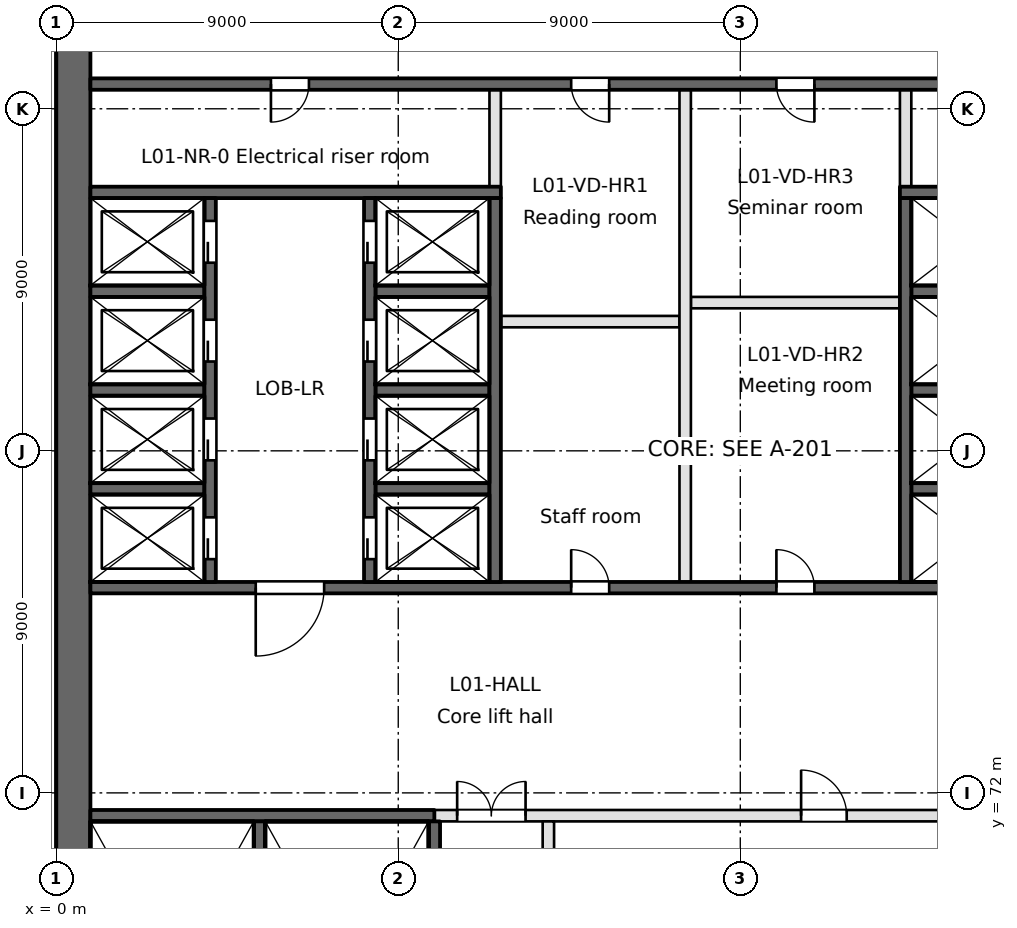
"""IFC4 building model, lengths in metres.
Left out: names, types, materials, properties, quantities, classifications, styles, units other than length and angle.
Written with IfcOpenShell. Run it as: python <this file> out.ifc"""

import sys

from ifc_helpers import new_model, si_unit, direction, frame, frame_2d, origin, place, context, subcontext, project, spatial, rectangle, extrude, element, fill, save


model = new_model("IFC4")
c1 = context("Model", 3, precision=1e-05, world=origin(), true_north=direction((0.0, 1.0)))
c2 = subcontext(c1, "Body", "Model", "MODEL_VIEW")
j1 = project(units=[si_unit("LENGTHUNIT", "METRE"), si_unit("PLANEANGLEUNIT", "RADIAN")], contexts=[c1])
p1 = place(None, origin())
s1 = spatial("IfcSite", under=j1, at=p1, CompositionType="ELEMENT")
p2 = place(p1, origin())
s2 = spatial("IfcBuilding", under=s1, at=p2, CompositionType="ELEMENT")
p3 = place(p2, frame((0.0, 0.0, 6.0)))
s3 = spatial("IfcBuildingStorey", under=s2, at=p3, CompositionType="ELEMENT", Elevation=6.0)
p4 = place(p3, frame((0.45, 94.5, 0.0), z_axis=(0.0, 0.0, 1.0), x_axis=(0.0, -1.0, 0.0)))
e1 = element("IfcWall", 1, at=p4, inside=s3, PredefinedType="SHEAR", context=c2, shape_type="SweptSolid", body=[
    extrude(rectangle(XDim=66.085, YDim=0.9, at=frame_2d((33.042, 0.0))), origin(), (0.0, 0.0, 1.0), 5.4),
])
p5 = place(p3, frame((0.9, 71.4, -0.35), z_axis=(0.0, 0.0, 1.0), x_axis=(1.0, 0.0, 0.0)))
e2 = element("IfcWall", 2, at=p5, inside=s3, PredefinedType="SOLIDWALL", context=c2, shape_type="SweptSolid", body=[
    extrude(rectangle(XDim=9.05, YDim=0.3, at=frame_2d((4.525, 0.0))), origin(), (0.0, 0.0, 1.0), 5.4),
])
p6 = place(p3, frame((9.95, 71.4, 0.0), z_axis=(0.0, 0.0, 1.0), x_axis=(1.0, 0.0, 0.0)))
e3 = element("IfcWall", 3, at=p6, inside=s3, PredefinedType="PARTITIONING", context=c2, shape_type="SweptSolid", body=[
    extrude(rectangle(XDim=17.65, YDim=0.3, at=frame_2d((8.825, 0.0))), origin(), (0.0, 0.0, 1.0), 5.05),
])
p7 = place(p6, frame((0.6, 0.0, 0.0)))
e4 = element("IfcOpeningElement", 4, at=p7, cuts=e3, PredefinedType="OPENING", context=c2, shape_type="SweptSolid", body=[
    extrude(rectangle(XDim=1.8, YDim=2.1, at=frame_2d((0.9, 1.05))), frame((0.0, 0.15, 0.0), z_axis=(0.0, -1.0, 0.0), x_axis=(1.0, 0.0, 0.0)), (0.0, 0.0, 1.0), 0.3),
])
p8 = place(p6, frame((9.65, 0.0, 0.0)))
e5 = element("IfcOpeningElement", 5, at=p8, cuts=e3, PredefinedType="OPENING", context=c2, shape_type="SweptSolid", body=[
    extrude(rectangle(XDim=1.2, YDim=2.1, at=frame_2d((0.6, 1.05))), frame((0.0, 0.15, 0.0), z_axis=(0.0, -1.0, 0.0), x_axis=(1.0, 0.0, 0.0)), (0.0, 0.0, 1.0), 0.3),
])
p9 = place(p3, frame((0.9, 77.4, -0.35), z_axis=(0.0, 0.0, 1.0), x_axis=(1.0, 0.0, 0.0)))
e6 = element("IfcWall", 6, at=p9, inside=s3, PredefinedType="SOLIDWALL", context=c2, shape_type="SweptSolid", body=[
    extrude(rectangle(XDim=28.95, YDim=0.3, at=frame_2d((14.475, 0.0))), origin(), (0.0, 0.0, 1.0), 5.4),
])
p10 = place(p9, frame((4.35, 0.0, 0.35)))
e7 = element("IfcOpeningElement", 7, at=p10, cuts=e6, PredefinedType="OPENING", context=c2, shape_type="SweptSolid", body=[
    extrude(rectangle(XDim=1.8, YDim=2.1, at=frame_2d((0.9, 1.05))), frame((0.0, 0.15, 0.0), z_axis=(0.0, -1.0, 0.0), x_axis=(1.0, 0.0, 0.0)), (0.0, 0.0, 1.0), 0.3),
])
p11 = place(p9, frame((25.95, 0.0, 0.35)))
e8 = element("IfcOpeningElement", 8, at=p11, cuts=e6, PredefinedType="OPENING", context=c2, shape_type="SweptSolid", body=[
    extrude(rectangle(XDim=1.8, YDim=2.1, at=frame_2d((0.9, 1.05))), frame((0.0, 0.15, 0.0), z_axis=(0.0, -1.0, 0.0), x_axis=(1.0, 0.0, 0.0)), (0.0, 0.0, 1.0), 0.3),
])
p12 = place(p9, frame((12.65, 0.0, 0.35)))
e9 = element("IfcOpeningElement", 9, at=p12, cuts=e6, PredefinedType="OPENING", context=c2, shape_type="SweptSolid", body=[
    extrude(rectangle(XDim=1.0, YDim=2.1, at=frame_2d((0.5, 1.05))), frame((0.0, 0.15, 0.0), z_axis=(0.0, -1.0, 0.0), x_axis=(1.0, 0.0, 0.0)), (0.0, 0.0, 1.0), 0.3),
])
p13 = place(p9, frame((18.05, 0.0, 0.35)))
e10 = element("IfcOpeningElement", 10, at=p13, cuts=e6, PredefinedType="OPENING", context=c2, shape_type="SweptSolid", body=[
    extrude(rectangle(XDim=1.0, YDim=2.1, at=frame_2d((0.5, 1.05))), frame((0.0, 0.15, 0.0), z_axis=(0.0, -1.0, 0.0), x_axis=(1.0, 0.0, 0.0)), (0.0, 0.0, 1.0), 0.3),
])
for number, where, z_axis, x_axis in (
    (11, (0.9, 80.0, -0.35), (0.0, 0.0, 1.0), (1.0, 0.0, 0.0)),
    (12, (8.4, 80.0, -0.35), (0.0, 0.0, 1.0), (1.0, 0.0, 0.0)),
    (13, (22.5, 80.0, -0.35), (0.0, 0.0, 1.0), (1.0, 0.0, 0.0)),
    (14, (0.9, 82.6, -0.35), (0.0, 0.0, 1.0), (1.0, 0.0, 0.0)),
    (15, (8.4, 82.6, -0.35), (0.0, 0.0, 1.0), (1.0, 0.0, 0.0)),
    (16, (22.5, 82.6, -0.35), (0.0, 0.0, 1.0), (1.0, 0.0, 0.0)),
):
    element("IfcWall", number, at=place(p3, frame(where, z_axis=z_axis, x_axis=x_axis)), inside=s3, PredefinedType="SOLIDWALL", context=c2, shape_type="SweptSolid", body=[
        extrude(rectangle(XDim=3.0, YDim=0.3, at=frame_2d((1.5, 0.0))), origin(), (0.0, 0.0, 1.0), 5.4),
    ])
p14 = place(p3, frame((11.7, 84.4, 0.0), z_axis=(0.0, 0.0, 1.0), x_axis=(1.0, 0.0, 0.0)))
e17 = element("IfcWall", 17, at=p14, inside=s3, PredefinedType="PARTITIONING", context=c2, shape_type="SweptSolid", body=[
    extrude(rectangle(XDim=4.7, YDim=0.3, at=frame_2d((2.35, 0.0))), origin(), (0.0, 0.0, 1.0), 5.05),
])
p15 = place(p3, frame((16.7, 84.9, 0.0), z_axis=(0.0, 0.0, 1.0), x_axis=(1.0, 0.0, 0.0)))
e18 = element("IfcWall", 18, at=p15, inside=s3, PredefinedType="PARTITIONING", context=c2, shape_type="SweptSolid", body=[
    extrude(rectangle(XDim=5.5, YDim=0.3, at=frame_2d((2.75, 0.0))), origin(), (0.0, 0.0, 1.0), 5.05),
])
for number, where, z_axis, x_axis in (
    (19, (0.9, 85.2, -0.35), (0.0, 0.0, 1.0), (1.0, 0.0, 0.0)),
    (20, (8.4, 85.2, -0.35), (0.0, 0.0, 1.0), (1.0, 0.0, 0.0)),
    (21, (22.5, 85.2, -0.35), (0.0, 0.0, 1.0), (1.0, 0.0, 0.0)),
):
    element("IfcWall", number, at=place(p3, frame(where, z_axis=z_axis, x_axis=x_axis)), inside=s3, PredefinedType="SOLIDWALL", context=c2, shape_type="SweptSolid", body=[
        extrude(rectangle(XDim=3.0, YDim=0.3, at=frame_2d((1.5, 0.0))), origin(), (0.0, 0.0, 1.0), 5.4),
    ])
p16 = place(p3, frame((0.9, 87.8, -0.35), z_axis=(0.0, 0.0, 1.0), x_axis=(1.0, 0.0, 0.0)))
e22 = element("IfcWall", 22, at=p16, inside=s3, PredefinedType="SOLIDWALL", context=c2, shape_type="SweptSolid", body=[
    extrude(rectangle(XDim=10.8, YDim=0.3, at=frame_2d((5.4, 0.0))), origin(), (0.0, 0.0, 1.0), 5.4),
])
p17 = place(p3, frame((22.2, 87.8, -0.35), z_axis=(0.0, 0.0, 1.0), x_axis=(1.0, 0.0, 0.0)))
e23 = element("IfcWall", 23, at=p17, inside=s3, PredefinedType="SOLIDWALL", context=c2, shape_type="SweptSolid", body=[
    extrude(rectangle(XDim=7.8, YDim=0.3, at=frame_2d((3.9, 0.0))), origin(), (0.0, 0.0, 1.0), 5.4),
])
p18 = place(p3, frame((0.9, 90.65, -0.35), z_axis=(0.0, 0.0, 1.0), x_axis=(1.0, 0.0, 0.0)))
e24 = element("IfcWall", 24, at=p18, inside=s3, PredefinedType="SOLIDWALL", context=c2, shape_type="SweptSolid", body=[
    extrude(rectangle(XDim=34.6, YDim=0.3, at=frame_2d((17.3, 0.0))), origin(), (0.0, 0.0, 1.0), 5.4),
])
p19 = place(p18, frame((4.75, 0.0, 0.35)))
e25 = element("IfcOpeningElement", 25, at=p19, cuts=e24, PredefinedType="OPENING", context=c2, shape_type="SweptSolid", body=[
    extrude(rectangle(XDim=1.0, YDim=2.1, at=frame_2d((0.5, 1.05))), frame((0.0, 0.15, 0.0), z_axis=(0.0, -1.0, 0.0), x_axis=(1.0, 0.0, 0.0)), (0.0, 0.0, 1.0), 0.3),
])
p20 = place(p18, frame((24.7, 0.0, 0.35)))
e26 = element("IfcOpeningElement", 26, at=p20, cuts=e24, PredefinedType="OPENING", context=c2, shape_type="SweptSolid", body=[
    extrude(rectangle(XDim=1.0, YDim=2.1, at=frame_2d((0.5, 1.05))), frame((0.0, 0.15, 0.0), z_axis=(0.0, -1.0, 0.0), x_axis=(1.0, 0.0, 0.0)), (0.0, 0.0, 1.0), 0.3),
])
p21 = place(p18, frame((12.65, 0.0, 0.35)))
e27 = element("IfcOpeningElement", 27, at=p21, cuts=e24, PredefinedType="OPENING", context=c2, shape_type="SweptSolid", body=[
    extrude(rectangle(XDim=1.0, YDim=2.1, at=frame_2d((0.5, 1.05))), frame((0.0, 0.15, 0.0), z_axis=(0.0, -1.0, 0.0), x_axis=(1.0, 0.0, 0.0)), (0.0, 0.0, 1.0), 0.3),
])
p22 = place(p18, frame((18.05, 0.0, 0.35)))
e28 = element("IfcOpeningElement", 28, at=p22, cuts=e24, PredefinedType="OPENING", context=c2, shape_type="SweptSolid", body=[
    extrude(rectangle(XDim=1.0, YDim=2.1, at=frame_2d((0.5, 1.05))), frame((0.0, 0.15, 0.0), z_axis=(0.0, -1.0, 0.0), x_axis=(1.0, 0.0, 0.0)), (0.0, 0.0, 1.0), 0.3),
])
p23 = place(p18, frame((31.4, 0.0, 0.35)))
e29 = element("IfcOpeningElement", 29, at=p23, cuts=e24, PredefinedType="OPENING", context=c2, shape_type="SweptSolid", body=[
    extrude(rectangle(XDim=1.0, YDim=2.1, at=frame_2d((0.5, 1.05))), frame((0.0, 0.15, 0.0), z_axis=(0.0, -1.0, 0.0), x_axis=(1.0, 0.0, 0.0)), (0.0, 0.0, 1.0), 0.3),
])
p24 = place(p3, frame((4.05, 77.55, -0.35), z_axis=(0.0, 0.0, 1.0), x_axis=(0.0, 1.0, 0.0)))
e30 = element("IfcWall", 30, at=p24, inside=s3, PredefinedType="SOLIDWALL", context=c2, shape_type="SweptSolid", body=[
    extrude(rectangle(XDim=10.1, YDim=0.3, at=frame_2d((5.05, 0.0))), origin(), (0.0, 0.0, 1.0), 5.4),
])
p25 = place(p24, frame((0.6, 0.0, 0.35)))
e31 = element("IfcOpeningElement", 31, at=p25, cuts=e30, PredefinedType="OPENING", context=c2, shape_type="SweptSolid", body=[
    extrude(rectangle(XDim=1.1, YDim=2.1, at=frame_2d((0.55, 1.05))), frame((0.0, 0.15, 0.0), z_axis=(0.0, -1.0, 0.0), x_axis=(1.0, 0.0, 0.0)), (0.0, 0.0, 1.0), 0.3),
])
p26 = place(p24, frame((3.2, 0.0, 0.35)))
e32 = element("IfcOpeningElement", 32, at=p26, cuts=e30, PredefinedType="OPENING", context=c2, shape_type="SweptSolid", body=[
    extrude(rectangle(XDim=1.1, YDim=2.1, at=frame_2d((0.55, 1.05))), frame((0.0, 0.15, 0.0), z_axis=(0.0, -1.0, 0.0), x_axis=(1.0, 0.0, 0.0)), (0.0, 0.0, 1.0), 0.3),
])
p27 = place(p24, frame((5.8, 0.0, 0.35)))
e33 = element("IfcOpeningElement", 33, at=p27, cuts=e30, PredefinedType="OPENING", context=c2, shape_type="SweptSolid", body=[
    extrude(rectangle(XDim=1.1, YDim=2.1, at=frame_2d((0.55, 1.05))), frame((0.0, 0.15, 0.0), z_axis=(0.0, -1.0, 0.0), x_axis=(1.0, 0.0, 0.0)), (0.0, 0.0, 1.0), 0.3),
])
p28 = place(p24, frame((8.4, 0.0, 0.35)))
e34 = element("IfcOpeningElement", 34, at=p28, cuts=e30, PredefinedType="OPENING", context=c2, shape_type="SweptSolid", body=[
    extrude(rectangle(XDim=1.1, YDim=2.1, at=frame_2d((0.55, 1.05))), frame((0.0, 0.15, 0.0), z_axis=(0.0, -1.0, 0.0), x_axis=(1.0, 0.0, 0.0)), (0.0, 0.0, 1.0), 0.3),
])
p29 = place(p3, frame((5.35, 63.5, -0.35), z_axis=(0.0, 0.0, 1.0), x_axis=(0.0, 1.0, 0.0)))
e35 = element("IfcWall", 35, at=p29, inside=s3, PredefinedType="SOLIDWALL", context=c2, shape_type="SweptSolid", body=[
    extrude(rectangle(XDim=7.75, YDim=0.3, at=frame_2d((3.875, 0.0))), origin(), (0.0, 0.0, 1.0), 5.4),
])
p30 = place(p3, frame((8.25, 77.55, -0.35), z_axis=(0.0, 0.0, 1.0), x_axis=(0.0, 1.0, 0.0)))
e36 = element("IfcWall", 36, at=p30, inside=s3, PredefinedType="SOLIDWALL", context=c2, shape_type="SweptSolid", body=[
    extrude(rectangle(XDim=10.1, YDim=0.3, at=frame_2d((5.05, 0.0))), origin(), (0.0, 0.0, 1.0), 5.4),
])
p31 = place(p30, frame((0.6, 0.0, 0.35)))
e37 = element("IfcOpeningElement", 37, at=p31, cuts=e36, PredefinedType="OPENING", context=c2, shape_type="SweptSolid", body=[
    extrude(rectangle(XDim=1.1, YDim=2.1, at=frame_2d((0.55, 1.05))), frame((0.0, 0.15, 0.0), z_axis=(0.0, -1.0, 0.0), x_axis=(1.0, 0.0, 0.0)), (0.0, 0.0, 1.0), 0.3),
])
p32 = place(p30, frame((3.2, 0.0, 0.35)))
e38 = element("IfcOpeningElement", 38, at=p32, cuts=e36, PredefinedType="OPENING", context=c2, shape_type="SweptSolid", body=[
    extrude(rectangle(XDim=1.1, YDim=2.1, at=frame_2d((0.55, 1.05))), frame((0.0, 0.15, 0.0), z_axis=(0.0, -1.0, 0.0), x_axis=(1.0, 0.0, 0.0)), (0.0, 0.0, 1.0), 0.3),
])
p33 = place(p30, frame((5.8, 0.0, 0.35)))
e39 = element("IfcOpeningElement", 39, at=p33, cuts=e36, PredefinedType="OPENING", context=c2, shape_type="SweptSolid", body=[
    extrude(rectangle(XDim=1.1, YDim=2.1, at=frame_2d((0.55, 1.05))), frame((0.0, 0.15, 0.0), z_axis=(0.0, -1.0, 0.0), x_axis=(1.0, 0.0, 0.0)), (0.0, 0.0, 1.0), 0.3),
])
p34 = place(p30, frame((8.4, 0.0, 0.35)))
e40 = element("IfcOpeningElement", 40, at=p34, cuts=e36, PredefinedType="OPENING", context=c2, shape_type="SweptSolid", body=[
    extrude(rectangle(XDim=1.1, YDim=2.1, at=frame_2d((0.55, 1.05))), frame((0.0, 0.15, 0.0), z_axis=(0.0, -1.0, 0.0), x_axis=(1.0, 0.0, 0.0)), (0.0, 0.0, 1.0), 0.3),
])
p35 = place(p3, frame((9.95, 63.5, -0.35), z_axis=(0.0, 0.0, 1.0), x_axis=(0.0, 1.0, 0.0)))
e41 = element("IfcWall", 41, at=p35, inside=s3, PredefinedType="SOLIDWALL", context=c2, shape_type="SweptSolid", body=[
    extrude(rectangle(XDim=7.75, YDim=0.3, at=frame_2d((3.875, 0.0))), origin(), (0.0, 0.0, 1.0), 5.4),
])
p36 = place(p3, frame((11.55, 77.55, -0.35), z_axis=(0.0, 0.0, 1.0), x_axis=(0.0, 1.0, 0.0)))
e42 = element("IfcWall", 42, at=p36, inside=s3, PredefinedType="SOLIDWALL", context=c2, shape_type="SweptSolid", body=[
    extrude(rectangle(XDim=10.1, YDim=0.3, at=frame_2d((5.05, 0.0))), origin(), (0.0, 0.0, 1.0), 5.4),
])
p37 = place(p3, frame((11.55, 87.95, 0.0), z_axis=(0.0, 0.0, 1.0), x_axis=(0.0, 1.0, 0.0)))
e43 = element("IfcWall", 43, at=p37, inside=s3, PredefinedType="PARTITIONING", context=c2, shape_type="SweptSolid", body=[
    extrude(rectangle(XDim=2.55, YDim=0.3, at=frame_2d((1.275, 0.0))), origin(), (0.0, 0.0, 1.0), 5.05),
])
p38 = place(p3, frame((12.95, 63.5, 0.0), z_axis=(0.0, 0.0, 1.0), x_axis=(0.0, 1.0, 0.0)))
e44 = element("IfcWall", 44, at=p38, inside=s3, PredefinedType="PARTITIONING", context=c2, shape_type="SweptSolid", body=[
    extrude(rectangle(XDim=7.75, YDim=0.3, at=frame_2d((3.875, 0.0))), origin(), (0.0, 0.0, 1.0), 5.05),
])
p39 = place(p3, frame((16.55, 77.55, 0.0), z_axis=(0.0, 0.0, 1.0), x_axis=(0.0, 1.0, 0.0)))
e45 = element("IfcWall", 45, at=p39, inside=s3, PredefinedType="PARTITIONING", context=c2, shape_type="SweptSolid", body=[
    extrude(rectangle(XDim=12.95, YDim=0.3, at=frame_2d((6.475, 0.0))), origin(), (0.0, 0.0, 1.0), 5.05),
])
p40 = place(p3, frame((22.35, 77.55, -0.35), z_axis=(0.0, 0.0, 1.0), x_axis=(0.0, 1.0, 0.0)))
e46 = element("IfcWall", 46, at=p40, inside=s3, PredefinedType="SOLIDWALL", context=c2, shape_type="SweptSolid", body=[
    extrude(rectangle(XDim=10.1, YDim=0.3, at=frame_2d((5.05, 0.0))), origin(), (0.0, 0.0, 1.0), 5.4),
])
p41 = place(p3, frame((22.35, 87.95, 0.0), z_axis=(0.0, 0.0, 1.0), x_axis=(0.0, 1.0, 0.0)))
e47 = element("IfcWall", 47, at=p41, inside=s3, PredefinedType="PARTITIONING", context=c2, shape_type="SweptSolid", body=[
    extrude(rectangle(XDim=2.55, YDim=0.3, at=frame_2d((1.275, 0.0))), origin(), (0.0, 0.0, 1.0), 5.05),
])
p42 = place(p25, origin())
e48 = element("IfcDoor", 48, at=p42, inside=s3, OperationType="SLIDING_TO_RIGHT", PredefinedType="DOOR", context=c2, shape_type="SweptSolid", body=[
    extrude(rectangle(XDim=1.1, YDim=2.1, at=frame_2d((0.55, 1.05))), frame((0.0, 0.025, 0.0), z_axis=(0.0, -1.0, 0.0), x_axis=(1.0, 0.0, 0.0)), (0.0, 0.0, 1.0), 0.05),
])
fill(e31, e48)
p43 = place(p26, origin())
e49 = element("IfcDoor", 49, at=p43, inside=s3, OperationType="SLIDING_TO_LEFT", PredefinedType="DOOR", context=c2, shape_type="SweptSolid", body=[
    extrude(rectangle(XDim=1.1, YDim=2.1, at=frame_2d((0.55, 1.05))), frame((0.0, 0.025, 0.0), z_axis=(0.0, -1.0, 0.0), x_axis=(1.0, 0.0, 0.0)), (0.0, 0.0, 1.0), 0.05),
])
fill(e32, e49)
p44 = place(p27, origin())
e50 = element("IfcDoor", 50, at=p44, inside=s3, OperationType="SLIDING_TO_RIGHT", PredefinedType="DOOR", context=c2, shape_type="SweptSolid", body=[
    extrude(rectangle(XDim=1.1, YDim=2.1, at=frame_2d((0.55, 1.05))), frame((0.0, 0.025, 0.0), z_axis=(0.0, -1.0, 0.0), x_axis=(1.0, 0.0, 0.0)), (0.0, 0.0, 1.0), 0.05),
])
fill(e33, e50)
p45 = place(p28, origin())
e51 = element("IfcDoor", 51, at=p45, inside=s3, OperationType="SLIDING_TO_LEFT", PredefinedType="DOOR", context=c2, shape_type="SweptSolid", body=[
    extrude(rectangle(XDim=1.1, YDim=2.1, at=frame_2d((0.55, 1.05))), frame((0.0, 0.025, 0.0), z_axis=(0.0, -1.0, 0.0), x_axis=(1.0, 0.0, 0.0)), (0.0, 0.0, 1.0), 0.05),
])
fill(e34, e51)
p46 = place(p31, origin())
e52 = element("IfcDoor", 52, at=p46, inside=s3, OperationType="SLIDING_TO_RIGHT", PredefinedType="DOOR", context=c2, shape_type="SweptSolid", body=[
    extrude(rectangle(XDim=1.1, YDim=2.1, at=frame_2d((0.55, 1.05))), frame((0.0, 0.025, 0.0), z_axis=(0.0, -1.0, 0.0), x_axis=(1.0, 0.0, 0.0)), (0.0, 0.0, 1.0), 0.05),
])
fill(e37, e52)
p47 = place(p32, origin())
e53 = element("IfcDoor", 53, at=p47, inside=s3, OperationType="SLIDING_TO_LEFT", PredefinedType="DOOR", context=c2, shape_type="SweptSolid", body=[
    extrude(rectangle(XDim=1.1, YDim=2.1, at=frame_2d((0.55, 1.05))), frame((0.0, 0.025, 0.0), z_axis=(0.0, -1.0, 0.0), x_axis=(1.0, 0.0, 0.0)), (0.0, 0.0, 1.0), 0.05),
])
fill(e38, e53)
p48 = place(p33, origin())
e54 = element("IfcDoor", 54, at=p48, inside=s3, OperationType="SLIDING_TO_RIGHT", PredefinedType="DOOR", context=c2, shape_type="SweptSolid", body=[
    extrude(rectangle(XDim=1.1, YDim=2.1, at=frame_2d((0.55, 1.05))), frame((0.0, 0.025, 0.0), z_axis=(0.0, -1.0, 0.0), x_axis=(1.0, 0.0, 0.0)), (0.0, 0.0, 1.0), 0.05),
])
fill(e39, e54)
p49 = place(p34, origin())
e55 = element("IfcDoor", 55, at=p49, inside=s3, OperationType="SLIDING_TO_LEFT", PredefinedType="DOOR", context=c2, shape_type="SweptSolid", body=[
    extrude(rectangle(XDim=1.1, YDim=2.1, at=frame_2d((0.55, 1.05))), frame((0.0, 0.025, 0.0), z_axis=(0.0, -1.0, 0.0), x_axis=(1.0, 0.0, 0.0)), (0.0, 0.0, 1.0), 0.05),
])
fill(e40, e55)
p50 = place(p10, frame((1.8, 0.0, 0.0), z_axis=(0.0, 0.0, 1.0), x_axis=(-1.0, 0.0, 0.0)))
e56 = element("IfcDoor", 56, at=p50, inside=s3, OperationType="SINGLE_SWING_RIGHT", PredefinedType="DOOR", context=c2, shape_type="SweptSolid", body=[
    extrude(rectangle(XDim=1.8, YDim=2.1, at=frame_2d((0.9, 1.05))), frame((0.0, 0.025, 0.0), z_axis=(0.0, -1.0, 0.0), x_axis=(1.0, 0.0, 0.0)), (0.0, 0.0, 1.0), 0.05),
])
fill(e7, e56)
p51 = place(p7, origin())
e57 = element("IfcDoor", 57, at=p51, inside=s3, OperationType="DOUBLE_DOOR_SINGLE_SWING", PredefinedType="DOOR", context=c2, shape_type="SweptSolid", body=[
    extrude(rectangle(XDim=1.8, YDim=2.1, at=frame_2d((0.9, 1.05))), frame((0.0, 0.025, 0.0), z_axis=(0.0, -1.0, 0.0), x_axis=(1.0, 0.0, 0.0)), (0.0, 0.0, 1.0), 0.05),
])
fill(e4, e57)
p52 = place(p8, origin())
e58 = element("IfcDoor", 58, at=p52, inside=s3, OperationType="SINGLE_SWING_LEFT", PredefinedType="DOOR", context=c2, shape_type="SweptSolid", body=[
    extrude(rectangle(XDim=1.2, YDim=2.1, at=frame_2d((0.6, 1.05))), frame((0.0, 0.025, 0.0), z_axis=(0.0, -1.0, 0.0), x_axis=(1.0, 0.0, 0.0)), (0.0, 0.0, 1.0), 0.05),
])
fill(e5, e58)
p53 = place(p19, frame((1.0, 0.0, 0.0), z_axis=(0.0, 0.0, 1.0), x_axis=(-1.0, 0.0, 0.0)))
e59 = element("IfcDoor", 59, at=p53, inside=s3, OperationType="SINGLE_SWING_RIGHT", PredefinedType="DOOR", context=c2, shape_type="SweptSolid", body=[
    extrude(rectangle(XDim=1.0, YDim=2.1, at=frame_2d((0.5, 1.05))), frame((0.0, 0.025, 0.0), z_axis=(0.0, -1.0, 0.0), x_axis=(1.0, 0.0, 0.0)), (0.0, 0.0, 1.0), 0.05),
])
fill(e25, e59)
p54 = place(p12, origin())
e60 = element("IfcDoor", 60, at=p54, inside=s3, OperationType="SINGLE_SWING_LEFT", PredefinedType="DOOR", context=c2, shape_type="SweptSolid", body=[
    extrude(rectangle(XDim=1.0, YDim=2.1, at=frame_2d((0.5, 1.05))), frame((0.0, 0.025, 0.0), z_axis=(0.0, -1.0, 0.0), x_axis=(1.0, 0.0, 0.0)), (0.0, 0.0, 1.0), 0.05),
])
fill(e9, e60)
p55 = place(p21, frame((1.0, 0.0, 0.0), z_axis=(0.0, 0.0, 1.0), x_axis=(-1.0, 0.0, 0.0)))
e61 = element("IfcDoor", 61, at=p55, inside=s3, OperationType="SINGLE_SWING_LEFT", PredefinedType="DOOR", context=c2, shape_type="SweptSolid", body=[
    extrude(rectangle(XDim=1.0, YDim=2.1, at=frame_2d((0.5, 1.05))), frame((0.0, 0.025, 0.0), z_axis=(0.0, -1.0, 0.0), x_axis=(1.0, 0.0, 0.0)), (0.0, 0.0, 1.0), 0.05),
])
fill(e27, e61)
p56 = place(p13, origin())
e62 = element("IfcDoor", 62, at=p56, inside=s3, OperationType="SINGLE_SWING_LEFT", PredefinedType="DOOR", context=c2, shape_type="SweptSolid", body=[
    extrude(rectangle(XDim=1.0, YDim=2.1, at=frame_2d((0.5, 1.05))), frame((0.0, 0.025, 0.0), z_axis=(0.0, -1.0, 0.0), x_axis=(1.0, 0.0, 0.0)), (0.0, 0.0, 1.0), 0.05),
])
fill(e10, e62)
p57 = place(p22, frame((1.0, 0.0, 0.0), z_axis=(0.0, 0.0, 1.0), x_axis=(-1.0, 0.0, 0.0)))
e63 = element("IfcDoor", 63, at=p57, inside=s3, OperationType="SINGLE_SWING_LEFT", PredefinedType="DOOR", context=c2, shape_type="SweptSolid", body=[
    extrude(rectangle(XDim=1.0, YDim=2.1, at=frame_2d((0.5, 1.05))), frame((0.0, 0.025, 0.0), z_axis=(0.0, -1.0, 0.0), x_axis=(1.0, 0.0, 0.0)), (0.0, 0.0, 1.0), 0.05),
])
fill(e28, e63)
save(model, sys.argv[1])
